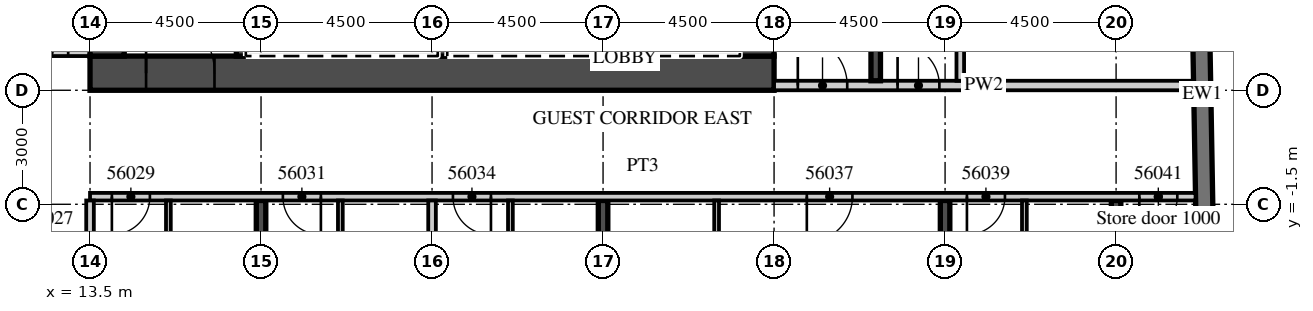
"""IFC4 building model, lengths in metres.
Left out: names, types, materials, properties, quantities, classifications, styles, units other than length and angle.
Written with IfcOpenShell. Run it as: python <this file> out.ifc"""

import sys

from ifc_helpers import new_model, si_unit, direction, frame, frame_2d, origin, place, context, subcontext, project, spatial, rectangle, extrude, element, fill, save


model = new_model("IFC4")
c1 = context("Model", 3, precision=1e-05, world=origin(), true_north=direction((0.0, 1.0)))
c2 = subcontext(c1, "Body", "Model", "MODEL_VIEW")
j1 = project(units=[si_unit("LENGTHUNIT", "METRE"), si_unit("PLANEANGLEUNIT", "RADIAN")], contexts=[c1])
p1 = place(None, origin())
s1 = spatial("IfcSite", under=j1, at=p1, CompositionType="ELEMENT")
p2 = place(p1, origin())
s2 = spatial("IfcBuilding", under=s1, at=p2, CompositionType="ELEMENT")
p3 = place(p2, frame((0.0, 0.0, 230.9)))
s3 = spatial("IfcBuildingStorey", under=s2, at=p3, CompositionType="ELEMENT", Elevation=230.9)
p4 = place(p3, frame((18.0, -19.079, 0.0), z_axis=(0.0, 0.0, 1.0), x_axis=(0.0, 1.0, 0.0)))
e1 = element("IfcWall", 1, at=p4, inside=s3, PredefinedType="SHEAR", context=c2, shape_type="SweptSolid", body=[
    extrude(rectangle(XDim=17.679, YDim=0.25, at=frame_2d((8.84, 0.0))), origin(), (0.0, 0.0, 1.0), 3.3),
])
p5 = place(p3, frame((27.0, -18.922, 0.0), z_axis=(0.0, 0.0, 1.0), x_axis=(0.0, 1.0, 0.0)))
e2 = element("IfcWall", 2, at=p5, inside=s3, PredefinedType="SHEAR", context=c2, shape_type="SweptSolid", body=[
    extrude(rectangle(XDim=17.522, YDim=0.25, at=frame_2d((8.761, 0.0))), origin(), (0.0, 0.0, 1.0), 3.3),
])
p6 = place(p3, frame((36.0, -18.765, 0.0), z_axis=(0.0, 0.0, 1.0), x_axis=(0.0, 1.0, 0.0)))
e3 = element("IfcWall", 3, at=p6, inside=s3, PredefinedType="SHEAR", context=c2, shape_type="SweptSolid", body=[
    extrude(rectangle(XDim=17.365, YDim=0.25, at=frame_2d((8.683, 0.0))), origin(), (0.0, 0.0, 1.0), 3.3),
])
p7 = place(p3, frame((40.5, -18.325, 0.0), z_axis=(0.0, 0.0, 1.0), x_axis=(0.0, 1.0, 0.0)))
e4 = element("IfcWall", 4, at=p7, inside=s3, PredefinedType="SHEAR", context=c2, shape_type="SweptSolid", body=[
    extrude(rectangle(XDim=16.925, YDim=0.25, at=frame_2d((8.463, 0.0))), origin(), (0.0, 0.0, 1.0), 3.3),
])
p8 = place(p3, frame((43.057, -15.103, 0.0), z_axis=(0.0, 0.0, 1.0), x_axis=(-0.017452408953, 0.999847695112, 0.0)))
e5 = element("IfcWall", 5, at=p8, inside=s3, PredefinedType="SOLIDWALL", context=c2, shape_type="SweptSolid", body=[
    extrude(rectangle(XDim=33.0, YDim=0.45, at=frame_2d((16.5, 0.0))), origin(), (0.0, 0.0, 1.0), 3.02),
])
p9 = place(p3, frame((-13.5, 2.5, 0.0), z_axis=(0.0, 0.0, 1.0), x_axis=(1.0, 0.0, 0.0)))
e6 = element("IfcWall", 6, at=p9, inside=s3, PredefinedType="PARTITIONING", context=c2, shape_type="SweptSolid", body=[
    extrude(rectangle(XDim=27.0, YDim=0.2, at=frame_2d((13.5, 0.0))), origin(), (0.0, 0.0, 1.0), 3.02),
])
p10 = place(p9, frame((2.925, 0.0, 0.0)))
e7 = element("IfcOpeningElement", 7, at=p10, cuts=e6, PredefinedType="OPENING", context=c2, shape_type="SweptSolid", body=[
    extrude(rectangle(XDim=1.0, YDim=2.1, at=frame_2d((0.5, 1.05))), frame((0.0, 0.11, 0.0), z_axis=(0.0, -1.0, 0.0), x_axis=(1.0, 0.0, 0.0)), (0.0, 0.0, 1.0), 0.22),
])
p11 = place(p9, frame((6.938, 0.0, 0.0)))
e8 = element("IfcOpeningElement", 8, at=p11, cuts=e6, PredefinedType="OPENING", context=c2, shape_type="SweptSolid", body=[
    extrude(rectangle(XDim=1.2, YDim=2.1, at=frame_2d((0.6, 1.05))), frame((0.0, 0.11, 0.0), z_axis=(0.0, -1.0, 0.0), x_axis=(1.0, 0.0, 0.0)), (0.0, 0.0, 1.0), 0.22),
])
p12 = place(p9, frame((14.075, 0.0, 0.0)))
e9 = element("IfcOpeningElement", 9, at=p12, cuts=e6, PredefinedType="OPENING", context=c2, shape_type="SweptSolid", body=[
    extrude(rectangle(XDim=1.0, YDim=2.1, at=frame_2d((0.5, 1.05))), frame((0.0, 0.11, 0.0), z_axis=(0.0, -1.0, 0.0), x_axis=(1.0, 0.0, 0.0)), (0.0, 0.0, 1.0), 0.22),
])
p13 = place(p9, frame((20.925, 0.0, 0.0)))
e10 = element("IfcOpeningElement", 10, at=p13, cuts=e6, PredefinedType="OPENING", context=c2, shape_type="SweptSolid", body=[
    extrude(rectangle(XDim=1.0, YDim=2.1, at=frame_2d((0.5, 1.05))), frame((0.0, 0.11, 0.0), z_axis=(0.0, -1.0, 0.0), x_axis=(1.0, 0.0, 0.0)), (0.0, 0.0, 1.0), 0.22),
])
p14 = place(p9, frame((25.425, 0.0, 0.0)))
e11 = element("IfcOpeningElement", 11, at=p14, cuts=e6, PredefinedType="OPENING", context=c2, shape_type="SweptSolid", body=[
    extrude(rectangle(XDim=1.0, YDim=2.1, at=frame_2d((0.5, 1.05))), frame((0.0, 0.11, 0.0), z_axis=(0.0, -1.0, 0.0), x_axis=(1.0, 0.0, 0.0)), (0.0, 0.0, 1.0), 0.22),
])
p15 = place(p3, frame((13.5, -1.3, 0.0), z_axis=(0.0, 0.0, 1.0), x_axis=(1.0, 0.0, 0.0)))
e12 = element("IfcWall", 12, at=p15, inside=s3, PredefinedType="PARTITIONING", context=c2, shape_type="SweptSolid", body=[
    extrude(rectangle(XDim=29.091, YDim=0.2, at=frame_2d((14.545, 0.0))), origin(), (0.0, 0.0, 1.0), 3.02),
])
p16 = place(p15, frame((0.575, 0.0, 0.0)))
e13 = element("IfcOpeningElement", 13, at=p16, cuts=e12, PredefinedType="OPENING", context=c2, shape_type="SweptSolid", body=[
    extrude(rectangle(XDim=1.0, YDim=2.1, at=frame_2d((0.5, 1.05))), frame((0.0, 0.11, 0.0), z_axis=(0.0, -1.0, 0.0), x_axis=(1.0, 0.0, 0.0)), (0.0, 0.0, 1.0), 0.22),
])
p17 = place(p15, frame((5.075, 0.0, 0.0)))
e14 = element("IfcOpeningElement", 14, at=p17, cuts=e12, PredefinedType="OPENING", context=c2, shape_type="SweptSolid", body=[
    extrude(rectangle(XDim=1.0, YDim=2.1, at=frame_2d((0.5, 1.05))), frame((0.0, 0.11, 0.0), z_axis=(0.0, -1.0, 0.0), x_axis=(1.0, 0.0, 0.0)), (0.0, 0.0, 1.0), 0.22),
])
p18 = place(p15, frame((9.55, 0.0, 0.0)))
e15 = element("IfcOpeningElement", 15, at=p18, cuts=e12, PredefinedType="OPENING", context=c2, shape_type="SweptSolid", body=[
    extrude(rectangle(XDim=1.0, YDim=2.1, at=frame_2d((0.5, 1.05))), frame((0.0, 0.11, 0.0), z_axis=(0.0, -1.0, 0.0), x_axis=(1.0, 0.0, 0.0)), (0.0, 0.0, 1.0), 0.22),
])
p19 = place(p15, frame((18.862, 0.0, 0.0)))
e16 = element("IfcOpeningElement", 16, at=p19, cuts=e12, PredefinedType="OPENING", context=c2, shape_type="SweptSolid", body=[
    extrude(rectangle(XDim=1.2, YDim=2.1, at=frame_2d((0.6, 1.05))), frame((0.0, 0.11, 0.0), z_axis=(0.0, -1.0, 0.0), x_axis=(1.0, 0.0, 0.0)), (0.0, 0.0, 1.0), 0.22),
])
p20 = place(p15, frame((23.075, 0.0, 0.0)))
e17 = element("IfcOpeningElement", 17, at=p20, cuts=e12, PredefinedType="OPENING", context=c2, shape_type="SweptSolid", body=[
    extrude(rectangle(XDim=1.0, YDim=2.1, at=frame_2d((0.5, 1.05))), frame((0.0, 0.11, 0.0), z_axis=(0.0, -1.0, 0.0), x_axis=(1.0, 0.0, 0.0)), (0.0, 0.0, 1.0), 0.22),
])
p21 = place(p15, frame((27.611, 0.0, 0.0)))
e18 = element("IfcOpeningElement", 18, at=p21, cuts=e12, PredefinedType="OPENING", context=c2, shape_type="SweptSolid", body=[
    extrude(rectangle(XDim=1.0, YDim=2.4, at=frame_2d((0.5, 1.2))), frame((0.0, 0.11, 0.0), z_axis=(0.0, -1.0, 0.0), x_axis=(1.0, 0.0, 0.0)), (0.0, 0.0, 1.0), 0.22),
])
p22 = place(p3, frame((13.5, -19.17, 0.0), z_axis=(0.0, 0.0, 1.0), x_axis=(0.0, 1.0, 0.0)))
e19 = element("IfcWall", 19, at=p22, inside=s3, PredefinedType="PARTITIONING", context=c2, shape_type="SweptSolid", body=[
    extrude(rectangle(XDim=17.77, YDim=0.2, at=frame_2d((8.885, 0.0))), origin(), (0.0, 0.0, 1.0), 3.02),
])
p23 = place(p3, frame((15.562, -7.125, 0.0), z_axis=(0.0, 0.0, 1.0), x_axis=(0.0, 1.0, 0.0)))
e20 = element("IfcWall", 20, at=p23, inside=s3, PredefinedType="PARTITIONING", context=c2, shape_type="SweptSolid", body=[
    extrude(rectangle(XDim=5.725, YDim=0.125, at=frame_2d((2.863, 0.0))), origin(), (0.0, 0.0, 1.0), 3.02),
])
p24 = place(p23, frame((2.375, 0.0, 0.0)))
e21 = element("IfcOpeningElement", 21, at=p24, cuts=e20, PredefinedType="OPENING", context=c2, shape_type="SweptSolid", body=[
    extrude(rectangle(XDim=0.9, YDim=2.1, at=frame_2d((0.45, 1.05))), frame((0.0, 0.073, 0.0), z_axis=(0.0, -1.0, 0.0), x_axis=(1.0, 0.0, 0.0)), (0.0, 0.0, 1.0), 0.145),
])
p25 = place(p3, frame((22.5, -19.013, 0.0), z_axis=(0.0, 0.0, 1.0), x_axis=(0.0, 1.0, 0.0)))
e22 = element("IfcWall", 22, at=p25, inside=s3, PredefinedType="PARTITIONING", context=c2, shape_type="SweptSolid", body=[
    extrude(rectangle(XDim=17.613, YDim=0.2, at=frame_2d((8.807, 0.0))), origin(), (0.0, 0.0, 1.0), 3.02),
])
p26 = place(p3, frame((20.087, -7.125, 0.0), z_axis=(0.0, 0.0, 1.0), x_axis=(0.0, 1.0, 0.0)))
e23 = element("IfcWall", 23, at=p26, inside=s3, PredefinedType="PARTITIONING", context=c2, shape_type="SweptSolid", body=[
    extrude(rectangle(XDim=5.725, YDim=0.125, at=frame_2d((2.863, 0.0))), origin(), (0.0, 0.0, 1.0), 3.02),
])
p27 = place(p26, frame((2.375, 0.0, 0.0)))
e24 = element("IfcOpeningElement", 24, at=p27, cuts=e23, PredefinedType="OPENING", context=c2, shape_type="SweptSolid", body=[
    extrude(rectangle(XDim=0.9, YDim=2.1, at=frame_2d((0.45, 1.05))), frame((0.0, 0.073, 0.0), z_axis=(0.0, -1.0, 0.0), x_axis=(1.0, 0.0, 0.0)), (0.0, 0.0, 1.0), 0.145),
])
p28 = place(p3, frame((24.562, -7.125, 0.0), z_axis=(0.0, 0.0, 1.0), x_axis=(0.0, 1.0, 0.0)))
e25 = element("IfcWall", 25, at=p28, inside=s3, PredefinedType="PARTITIONING", context=c2, shape_type="SweptSolid", body=[
    extrude(rectangle(XDim=5.725, YDim=0.125, at=frame_2d((2.863, 0.0))), origin(), (0.0, 0.0, 1.0), 3.02),
])
p29 = place(p28, frame((2.375, 0.0, 0.0)))
e26 = element("IfcOpeningElement", 26, at=p29, cuts=e25, PredefinedType="OPENING", context=c2, shape_type="SweptSolid", body=[
    extrude(rectangle(XDim=0.9, YDim=2.1, at=frame_2d((0.45, 1.05))), frame((0.0, 0.073, 0.0), z_axis=(0.0, -1.0, 0.0), x_axis=(1.0, 0.0, 0.0)), (0.0, 0.0, 1.0), 0.145),
])
p30 = place(p3, frame((29.988, -7.125, 0.0), z_axis=(0.0, 0.0, 1.0), x_axis=(0.0, 1.0, 0.0)))
e27 = element("IfcWall", 27, at=p30, inside=s3, PredefinedType="PARTITIONING", context=c2, shape_type="SweptSolid", body=[
    extrude(rectangle(XDim=5.725, YDim=0.125, at=frame_2d((2.863, 0.0))), origin(), (0.0, 0.0, 1.0), 3.02),
])
p31 = place(p30, frame((2.375, 0.0, 0.0)))
e28 = element("IfcOpeningElement", 28, at=p31, cuts=e27, PredefinedType="OPENING", context=c2, shape_type="SweptSolid", body=[
    extrude(rectangle(XDim=0.9, YDim=2.1, at=frame_2d((0.45, 1.05))), frame((0.0, 0.073, 0.0), z_axis=(0.0, -1.0, 0.0), x_axis=(1.0, 0.0, 0.0)), (0.0, 0.0, 1.0), 0.145),
])
p32 = place(p3, frame((38.087, -7.125, 0.0), z_axis=(0.0, 0.0, 1.0), x_axis=(0.0, 1.0, 0.0)))
e29 = element("IfcWall", 29, at=p32, inside=s3, PredefinedType="PARTITIONING", context=c2, shape_type="SweptSolid", body=[
    extrude(rectangle(XDim=5.725, YDim=0.125, at=frame_2d((2.863, 0.0))), origin(), (0.0, 0.0, 1.0), 3.02),
])
p33 = place(p32, frame((2.375, 0.0, 0.0)))
e30 = element("IfcOpeningElement", 30, at=p33, cuts=e29, PredefinedType="OPENING", context=c2, shape_type="SweptSolid", body=[
    extrude(rectangle(XDim=0.9, YDim=2.1, at=frame_2d((0.45, 1.05))), frame((0.0, 0.073, 0.0), z_axis=(0.0, -1.0, 0.0), x_axis=(1.0, 0.0, 0.0)), (0.0, 0.0, 1.0), 0.145),
])
p34 = place(p3, frame((13.5, 1.95, 0.0), z_axis=(0.0, 0.0, 1.0), x_axis=(1.0, 0.0, 0.0)))
e31 = element("IfcWall", 31, at=p34, inside=s3, PredefinedType="SHEAR", context=c2, shape_type="SweptSolid", body=[
    extrude(rectangle(XDim=18.0, YDim=0.9, at=frame_2d((9.0, 0.0))), origin(), (0.0, 0.0, 1.0), 3.02),
])
p35 = place(p34, frame((1.475, 0.0, 0.0)))
e32 = element("IfcOpeningElement", 32, at=p35, cuts=e31, PredefinedType="OPENING", context=c2, shape_type="SweptSolid", body=[
    extrude(rectangle(XDim=1.8, YDim=2.1, at=frame_2d((0.9, 1.05))), frame((0.0, 0.46, 0.0), z_axis=(0.0, -1.0, 0.0), x_axis=(1.0, 0.0, 0.0)), (0.0, 0.0, 1.0), 0.92),
])
p36 = place(p3, frame((31.05, 2.4, 0.0), z_axis=(0.0, 0.0, 1.0), x_axis=(0.0, 1.0, 0.0)))
e33 = element("IfcWall", 33, at=p36, inside=s3, PredefinedType="SHEAR", context=c2, shape_type="SweptSolid", body=[
    extrude(rectangle(XDim=12.8, YDim=0.9, at=frame_2d((6.4, 0.0))), origin(), (0.0, 0.0, 1.0), 3.02),
])
p37 = place(p36, frame((0.2, 0.0, 0.0)))
e34 = element("IfcOpeningElement", 34, at=p37, cuts=e33, PredefinedType="OPENING", context=c2, shape_type="SweptSolid", body=[
    extrude(rectangle(XDim=1.1, YDim=2.1, at=frame_2d((0.55, 1.05))), frame((0.0, 0.46, 0.0), z_axis=(0.0, -1.0, 0.0), x_axis=(1.0, 0.0, 0.0)), (0.0, 0.0, 1.0), 0.92),
])
p38 = place(p3, frame((13.95, 2.4, 0.0), z_axis=(0.0, 0.0, 1.0), x_axis=(0.0, 1.0, 0.0)))
e35 = element("IfcWall", 35, at=p38, inside=s3, PredefinedType="SHEAR", context=c2, shape_type="SweptSolid", body=[
    extrude(rectangle(XDim=12.2, YDim=0.9, at=frame_2d((6.1, 0.0))), origin(), (0.0, 0.0, 1.0), 3.02),
])
p39 = place(p3, frame((17.475, 2.4, 0.0), z_axis=(0.0, 0.0, 1.0), x_axis=(0.0, 1.0, 0.0)))
e36 = element("IfcWall", 36, at=p39, inside=s3, PredefinedType="SHEAR", context=c2, shape_type="SweptSolid", body=[
    extrude(rectangle(XDim=3.15, YDim=0.25, at=frame_2d((1.575, 0.0))), origin(), (0.0, 0.0, 1.0), 3.02),
])
for number, where, z_axis, x_axis in (
    (37, (27.975, 2.4, 0.0), (0.0, 0.0, 1.0), (0.0, 1.0, 0.0)),
    (38, (22.775, 2.4, 0.0), (0.0, 0.0, 1.0), (0.0, 1.0, 0.0)),
):
    element("IfcWall", number, at=place(p3, frame(where, z_axis=z_axis, x_axis=x_axis)), inside=s3, PredefinedType="SHEAR", context=c2, shape_type="SweptSolid", body=[
        extrude(rectangle(XDim=2.9, YDim=0.25, at=frame_2d((1.45, 0.0))), origin(), (0.0, 0.0, 1.0), 3.02),
    ])
p40 = place(p3, frame((31.5, 1.625, 0.0), z_axis=(0.0, 0.0, 1.0), x_axis=(1.0, 0.0, 0.0)))
e39 = element("IfcWall", 39, at=p40, inside=s3, PredefinedType="PARTITIONING", context=c2, shape_type="SweptSolid", body=[
    extrude(rectangle(XDim=11.04, YDim=0.25, at=frame_2d((5.52, 0.0))), origin(), (0.0, 0.0, 1.0), 3.02),
])
p41 = place(p40, frame((0.625, 0.0, 0.0)))
e40 = element("IfcOpeningElement", 40, at=p41, cuts=e39, PredefinedType="OPENING", context=c2, shape_type="SweptSolid", body=[
    extrude(rectangle(XDim=1.3, YDim=2.1, at=frame_2d((0.65, 1.05))), frame((0.0, 0.135, 0.0), z_axis=(0.0, -1.0, 0.0), x_axis=(1.0, 0.0, 0.0)), (0.0, 0.0, 1.0), 0.27),
])
p42 = place(p40, frame((3.25, 0.0, 0.0)))
e41 = element("IfcOpeningElement", 41, at=p42, cuts=e39, PredefinedType="OPENING", context=c2, shape_type="SweptSolid", body=[
    extrude(rectangle(XDim=1.1, YDim=2.1, at=frame_2d((0.55, 1.05))), frame((0.0, 0.135, 0.0), z_axis=(0.0, -1.0, 0.0), x_axis=(1.0, 0.0, 0.0)), (0.0, 0.0, 1.0), 0.27),
])
p43 = place(p3, frame((34.175, 1.75, 0.0), z_axis=(0.0, 0.0, 1.0), x_axis=(0.0, 1.0, 0.0)))
e42 = element("IfcWall", 42, at=p43, inside=s3, PredefinedType="SHEAR", context=c2, shape_type="SweptSolid", body=[
    extrude(rectangle(XDim=8.35, YDim=0.25, at=frame_2d((4.175, 0.0))), origin(), (0.0, 0.0, 1.0), 3.02),
])
p44 = place(p3, frame((36.4, 1.75, 0.0), z_axis=(0.0, 0.0, 1.0), x_axis=(0.0, 1.0, 0.0)))
e43 = element("IfcWall", 43, at=p44, inside=s3, PredefinedType="PARTITIONING", context=c2, shape_type="SweptSolid", body=[
    extrude(rectangle(XDim=15.95, YDim=0.2, at=frame_2d((7.975, 0.0))), origin(), (0.0, 0.0, 1.0), 3.02),
])
p45 = place(p44, frame((14.7, 0.0, 0.0)))
e44 = element("IfcOpeningElement", 44, at=p45, cuts=e43, PredefinedType="OPENING", context=c2, shape_type="SweptSolid", body=[
    extrude(rectangle(XDim=0.9, YDim=2.1, at=frame_2d((0.45, 1.05))), frame((0.0, 0.11, 0.0), z_axis=(0.0, -1.0, 0.0), x_axis=(1.0, 0.0, 0.0)), (0.0, 0.0, 1.0), 0.22),
])
p46 = place(p14, origin())
e45 = element("IfcDoor", 45, at=p46, inside=s3, OperationType="SINGLE_SWING_RIGHT", PredefinedType="DOOR", context=c2, shape_type="SweptSolid", body=[
    extrude(rectangle(XDim=1.0, YDim=2.1, at=frame_2d((0.5, 1.05))), frame((0.0, 0.025, 0.0), z_axis=(0.0, -1.0, 0.0), x_axis=(1.0, 0.0, 0.0)), (0.0, 0.0, 1.0), 0.05),
])
fill(e11, e45)
p47 = place(p16, origin())
e46 = element("IfcDoor", 46, at=p47, inside=s3, OperationType="SINGLE_SWING_LEFT", PredefinedType="DOOR", context=c2, shape_type="SweptSolid", body=[
    extrude(rectangle(XDim=1.0, YDim=2.1, at=frame_2d((0.5, 1.05))), frame((0.0, 0.025, 0.0), z_axis=(0.0, -1.0, 0.0), x_axis=(1.0, 0.0, 0.0)), (0.0, 0.0, 1.0), 0.05),
])
fill(e13, e46)
p48 = place(p17, origin())
e47 = element("IfcDoor", 47, at=p48, inside=s3, OperationType="SINGLE_SWING_RIGHT", PredefinedType="DOOR", context=c2, shape_type="SweptSolid", body=[
    extrude(rectangle(XDim=1.0, YDim=2.1, at=frame_2d((0.5, 1.05))), frame((0.0, 0.025, 0.0), z_axis=(0.0, -1.0, 0.0), x_axis=(1.0, 0.0, 0.0)), (0.0, 0.0, 1.0), 0.05),
])
fill(e14, e47)
p49 = place(p18, origin())
e48 = element("IfcDoor", 48, at=p49, inside=s3, OperationType="SINGLE_SWING_RIGHT", PredefinedType="DOOR", context=c2, shape_type="SweptSolid", body=[
    extrude(rectangle(XDim=1.0, YDim=2.1, at=frame_2d((0.5, 1.05))), frame((0.0, 0.025, 0.0), z_axis=(0.0, -1.0, 0.0), x_axis=(1.0, 0.0, 0.0)), (0.0, 0.0, 1.0), 0.05),
])
fill(e15, e48)
p50 = place(p19, origin())
e49 = element("IfcDoor", 49, at=p50, inside=s3, OperationType="SINGLE_SWING_LEFT", PredefinedType="DOOR", context=c2, shape_type="SweptSolid", body=[
    extrude(rectangle(XDim=1.2, YDim=2.1, at=frame_2d((0.6, 1.05))), frame((0.0, 0.025, 0.0), z_axis=(0.0, -1.0, 0.0), x_axis=(1.0, 0.0, 0.0)), (0.0, 0.0, 1.0), 0.05),
])
fill(e16, e49)
p51 = place(p20, origin())
e50 = element("IfcDoor", 50, at=p51, inside=s3, OperationType="SINGLE_SWING_LEFT", PredefinedType="DOOR", context=c2, shape_type="SweptSolid", body=[
    extrude(rectangle(XDim=1.0, YDim=2.1, at=frame_2d((0.5, 1.05))), frame((0.0, 0.025, 0.0), z_axis=(0.0, -1.0, 0.0), x_axis=(1.0, 0.0, 0.0)), (0.0, 0.0, 1.0), 0.05),
])
fill(e17, e50)
p52 = place(p21, origin())
e51 = element("IfcDoor", 51, at=p52, inside=s3, OperationType="SINGLE_SWING_LEFT", PredefinedType="DOOR", context=c2, shape_type="SweptSolid", body=[
    extrude(rectangle(XDim=1.0, YDim=2.4, at=frame_2d((0.5, 1.2))), frame((0.0, 0.025, 0.0), z_axis=(0.0, -1.0, 0.0), x_axis=(1.0, 0.0, 0.0)), (0.0, 0.0, 1.0), 0.05),
])
fill(e18, e51)
p53 = place(p35, origin())
e52 = element("IfcDoor", 52, at=p53, inside=s3, OperationType="DOUBLE_DOOR_DOUBLE_SWING", PredefinedType="DOOR", context=c2, shape_type="SweptSolid", body=[
    extrude(rectangle(XDim=1.8, YDim=2.1, at=frame_2d((0.9, 1.05))), frame((0.0, 0.025, 0.0), z_axis=(0.0, -1.0, 0.0), x_axis=(1.0, 0.0, 0.0)), (0.0, 0.0, 1.0), 0.05),
])
fill(e32, e52)
p54 = place(p41, origin())
e53 = element("IfcDoor", 53, at=p54, inside=s3, OperationType="SINGLE_SWING_LEFT", PredefinedType="DOOR", context=c2, shape_type="SweptSolid", body=[
    extrude(rectangle(XDim=1.3, YDim=2.1, at=frame_2d((0.65, 1.05))), frame((0.0, 0.025, 0.0), z_axis=(0.0, -1.0, 0.0), x_axis=(1.0, 0.0, 0.0)), (0.0, 0.0, 1.0), 0.05),
])
fill(e40, e53)
p55 = place(p42, origin())
e54 = element("IfcDoor", 54, at=p55, inside=s3, OperationType="SINGLE_SWING_LEFT", PredefinedType="DOOR", context=c2, shape_type="SweptSolid", body=[
    extrude(rectangle(XDim=1.1, YDim=2.1, at=frame_2d((0.55, 1.05))), frame((0.0, 0.025, 0.0), z_axis=(0.0, -1.0, 0.0), x_axis=(1.0, 0.0, 0.0)), (0.0, 0.0, 1.0), 0.05),
])
fill(e41, e54)
save(model, sys.argv[1])
